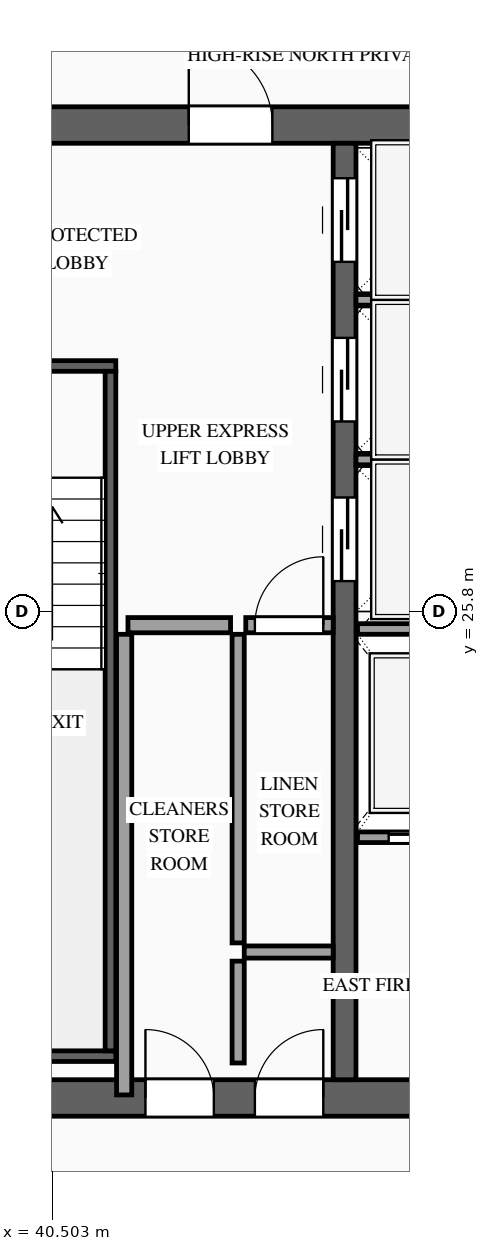
"""IFC4 building model, lengths in metres.
Left out: names, types, materials, properties, quantities, classifications, styles, units other than length and angle.
Written with IfcOpenShell. Run it as: python <this file> out.ifc"""

import sys

from ifc_helpers import new_model, si_unit, direction, frame, frame_2d, origin, place, context, subcontext, project, spatial, rectangle, extrude, source, transform, mapped, element, fill, save


model = new_model("IFC4")
c1 = context("Model", 3, precision=1e-05, world=origin(), true_north=direction((0.0, 1.0)))
c2 = subcontext(c1, "Body", "Model", "MODEL_VIEW")
j1 = project(units=[si_unit("LENGTHUNIT", "METRE"), si_unit("PLANEANGLEUNIT", "RADIAN")], contexts=[c1])
p1 = place(None, origin())
s1 = spatial("IfcSite", under=j1, at=p1, CompositionType="ELEMENT")
p2 = place(p1, origin())
s2 = spatial("IfcBuilding", under=s1, at=p2, CompositionType="ELEMENT")
p3 = place(p2, frame((0.0, 0.0, 289.1)))
s3 = spatial("IfcBuildingStorey", under=s2, at=p3, CompositionType="ELEMENT", Elevation=289.1)
p4 = place(p3, frame((23.56, 19.4, 0.0), z_axis=(0.0, 0.0, 1.0), x_axis=(1.0, 0.0, 0.0)))
e1 = element("IfcWall", 1, at=p4, inside=s3, PredefinedType="SHEAR", context=c2, shape_type="SweptSolid", body=[
    extrude(rectangle(XDim=26.88, YDim=0.48, at=frame_2d((13.44, 0.0))), origin(), (0.0, 0.0, 1.0), 3.5),
])
p5 = place(p4, frame((1.89, 0.0, 0.0)))
e2 = element("IfcOpeningElement", 2, at=p5, cuts=e1, PredefinedType="OPENING", context=c2, shape_type="SweptSolid", body=[
    extrude(rectangle(XDim=1.1, YDim=2.2, at=frame_2d((0.55, 1.1))), frame((0.0, 0.255, 0.0), z_axis=(0.0, -1.0, 0.0), x_axis=(1.0, 0.0, 0.0)), (0.0, 0.0, 1.0), 0.51),
])
p6 = place(p4, frame((9.79, 0.0, 0.0)))
e3 = element("IfcOpeningElement", 3, at=p6, cuts=e1, PredefinedType="OPENING", context=c2, shape_type="SweptSolid", body=[
    extrude(rectangle(XDim=1.1, YDim=2.2, at=frame_2d((0.55, 1.1))), frame((0.0, 0.255, 0.0), z_axis=(0.0, -1.0, 0.0), x_axis=(1.0, 0.0, 0.0)), (0.0, 0.0, 1.0), 0.51),
])
p7 = place(p4, frame((22.99, 0.0, 0.0)))
e4 = element("IfcOpeningElement", 4, at=p7, cuts=e1, PredefinedType="OPENING", context=c2, shape_type="SweptSolid", body=[
    extrude(rectangle(XDim=1.1, YDim=2.2, at=frame_2d((0.55, 1.1))), frame((0.0, 0.255, 0.0), z_axis=(0.0, -1.0, 0.0), x_axis=(1.0, 0.0, 0.0)), (0.0, 0.0, 1.0), 0.51),
])
p8 = place(p4, frame((19.61, 0.0, 0.0)))
e5 = element("IfcOpeningElement", 5, at=p8, cuts=e1, PredefinedType="OPENING", context=c2, shape_type="SweptSolid", body=[
    extrude(rectangle(XDim=0.9, YDim=2.15, at=frame_2d((0.45, 1.075))), frame((0.0, 0.255, 0.0), z_axis=(0.0, -1.0, 0.0), x_axis=(1.0, 0.0, 0.0)), (0.0, 0.0, 1.0), 0.51),
])
p9 = place(p4, frame((18.17, 0.0, 0.0)))
e6 = element("IfcOpeningElement", 6, at=p9, cuts=e1, PredefinedType="OPENING", context=c2, shape_type="SweptSolid", body=[
    extrude(rectangle(XDim=0.9, YDim=2.15, at=frame_2d((0.45, 1.075))), frame((0.0, 0.255, 0.0), z_axis=(0.0, -1.0, 0.0), x_axis=(1.0, 0.0, 0.0)), (0.0, 0.0, 1.0), 0.51),
])
p10 = place(p3, frame((23.56, 32.2, 0.0), z_axis=(0.0, 0.0, 1.0), x_axis=(1.0, 0.0, 0.0)))
e7 = element("IfcWall", 7, at=p10, inside=s3, PredefinedType="SHEAR", context=c2, shape_type="SweptSolid", body=[
    extrude(rectangle(XDim=26.88, YDim=0.48, at=frame_2d((13.44, 0.0))), origin(), (0.0, 0.0, 1.0), 3.5),
])
p11 = place(p10, frame((4.51, 0.0, 0.0)))
e8 = element("IfcOpeningElement", 8, at=p11, cuts=e7, PredefinedType="OPENING", context=c2, shape_type="SweptSolid", body=[
    extrude(rectangle(XDim=0.9, YDim=2.15, at=frame_2d((0.45, 1.075))), frame((0.0, 0.255, 0.0), z_axis=(0.0, -1.0, 0.0), x_axis=(1.0, 0.0, 0.0)), (0.0, 0.0, 1.0), 0.51),
])
p12 = place(p10, frame((9.79, 0.0, 0.0)))
e9 = element("IfcOpeningElement", 9, at=p12, cuts=e7, PredefinedType="OPENING", context=c2, shape_type="SweptSolid", body=[
    extrude(rectangle(XDim=1.1, YDim=2.2, at=frame_2d((0.55, 1.1))), frame((0.0, 0.255, 0.0), z_axis=(0.0, -1.0, 0.0), x_axis=(1.0, 0.0, 0.0)), (0.0, 0.0, 1.0), 0.51),
])
p13 = place(p10, frame((15.64, 0.0, 0.0)))
e10 = element("IfcOpeningElement", 10, at=p13, cuts=e7, PredefinedType="OPENING", context=c2, shape_type="SweptSolid", body=[
    extrude(rectangle(XDim=1.1, YDim=2.2, at=frame_2d((0.55, 1.1))), frame((0.0, 0.255, 0.0), z_axis=(0.0, -1.0, 0.0), x_axis=(1.0, 0.0, 0.0)), (0.0, 0.0, 1.0), 0.51),
])
p14 = place(p10, frame((18.74, 0.0, 0.0)))
e11 = element("IfcOpeningElement", 11, at=p14, cuts=e7, PredefinedType="OPENING", context=c2, shape_type="SweptSolid", body=[
    extrude(rectangle(XDim=1.1, YDim=2.2, at=frame_2d((0.55, 1.1))), frame((0.0, 0.255, 0.0), z_axis=(0.0, -1.0, 0.0), x_axis=(1.0, 0.0, 0.0)), (0.0, 0.0, 1.0), 0.51),
])
p15 = place(p3, frame((44.35, 19.64, 0.0), z_axis=(0.0, 0.0, 1.0), x_axis=(0.0, 1.0, 0.0)))
e12 = element("IfcWall", 12, at=p15, inside=s3, PredefinedType="SOLIDWALL", context=c2, shape_type="SweptSolid", body=[
    extrude(rectangle(XDim=12.32, YDim=0.3, at=frame_2d((6.16, 0.0))), origin(), (0.0, 0.0, 1.0), 3.5),
])
p16 = place(p15, frame((6.56, 0.0, 0.0)))
e13 = element("IfcOpeningElement", 13, at=p16, cuts=e12, PredefinedType="OPENING", context=c2, shape_type="SweptSolid", body=[
    extrude(rectangle(XDim=1.1, YDim=2.2, at=frame_2d((0.55, 1.1))), frame((0.0, 0.165, 0.0), z_axis=(0.0, -1.0, 0.0), x_axis=(1.0, 0.0, 0.0)), (0.0, 0.0, 1.0), 0.33),
])
p17 = place(p15, frame((8.66, 0.0, 0.0)))
e14 = element("IfcOpeningElement", 14, at=p17, cuts=e12, PredefinedType="OPENING", context=c2, shape_type="SweptSolid", body=[
    extrude(rectangle(XDim=1.1, YDim=2.2, at=frame_2d((0.55, 1.1))), frame((0.0, 0.165, 0.0), z_axis=(0.0, -1.0, 0.0), x_axis=(1.0, 0.0, 0.0)), (0.0, 0.0, 1.0), 0.33),
])
p18 = place(p15, frame((10.76, 0.0, 0.0)))
e15 = element("IfcOpeningElement", 15, at=p18, cuts=e12, PredefinedType="OPENING", context=c2, shape_type="SweptSolid", body=[
    extrude(rectangle(XDim=1.1, YDim=2.2, at=frame_2d((0.55, 1.1))), frame((0.0, 0.165, 0.0), z_axis=(0.0, -1.0, 0.0), x_axis=(1.0, 0.0, 0.0)), (0.0, 0.0, 1.0), 0.33),
])
p19 = place(p3, frame((44.52, 22.83, 0.0), z_axis=(0.0, 0.0, 1.0), x_axis=(1.0, 0.0, 0.0)))
e16 = element("IfcWall", 16, at=p19, inside=s3, PredefinedType="SOLIDWALL", context=c2, shape_type="SweptSolid", body=[
    extrude(rectangle(XDim=1.92, YDim=0.14, at=frame_2d((0.96, 0.0))), origin(), (0.0, 0.0, 1.0), 3.28),
])
p20 = place(p19, frame((0.41, 0.0, 0.0)))
e17 = element("IfcOpeningElement", 17, at=p20, cuts=e16, PredefinedType="OPENING", context=c2, shape_type="SweptSolid", body=[
    extrude(rectangle(XDim=1.1, YDim=2.2, at=frame_2d((0.55, 1.1))), frame((0.0, 0.085, 0.0), z_axis=(0.0, -1.0, 0.0), x_axis=(1.0, 0.0, 0.0)), (0.0, 0.0, 1.0), 0.17),
])
m1 = source(origin(), c2, "Body", "SweptSolid", [
    extrude(rectangle(XDim=1.92, YDim=0.14, at=frame_2d((0.96, 0.0))), origin(), (0.0, 0.0, 1.0), 3.28),
])
p21 = place(p3, frame((44.52, 25.57, 0.0), z_axis=(0.0, 0.0, 1.0), x_axis=(1.0, 0.0, 0.0)))
e18 = element("IfcWall", 18, at=p21, inside=s3, PredefinedType="SOLIDWALL", context=c2, shape_type="MappedRepresentation", body=[
    mapped(m1, transform((0.0, 0.0, 0.0), scale=1.0)),
])
m2 = source(origin(), c2, "Body", "SweptSolid", [
    extrude(rectangle(XDim=2.0, YDim=0.14, at=frame_2d((1.0, 0.0))), origin(), (0.0, 0.0, 1.0), 3.28),
])
for number, where, z_axis, x_axis in (
    (19, (44.5, 27.8, 0.0), (0.0, 0.0, 1.0), (1.0, 0.0, 0.0)),
    (20, (44.5, 29.9, 0.0), (0.0, 0.0, 1.0), (1.0, 0.0, 0.0)),
):
    element("IfcWall", number, at=place(p3, frame(where, z_axis=z_axis, x_axis=x_axis)), inside=s3, PredefinedType="SOLIDWALL", context=c2, shape_type="MappedRepresentation", body=[
        mapped(m2, transform((0.0, 0.0, 0.0), scale=1.0)),
    ])
p22 = place(p3, frame((38.2, 29.03, 0.0), z_axis=(0.0, 0.0, 1.0), x_axis=(1.0, 0.0, 0.0)))
e21 = element("IfcWall", 21, at=p22, inside=s3, PredefinedType="SOLIDWALL", context=c2, shape_type="SweptSolid", body=[
    extrude(rectangle(XDim=3.14, YDim=0.14, at=frame_2d((1.57, 0.0))), origin(), (0.0, 0.0, 1.0), 3.28),
])
p23 = place(p22, frame((1.02, 0.0, 0.0)))
e22 = element("IfcOpeningElement", 22, at=p23, cuts=e21, PredefinedType="OPENING", context=c2, shape_type="SweptSolid", body=[
    extrude(rectangle(XDim=1.1, YDim=2.2, at=frame_2d((0.55, 1.1))), frame((0.0, 0.085, 0.0), z_axis=(0.0, -1.0, 0.0), x_axis=(1.0, 0.0, 0.0)), (0.0, 0.0, 1.0), 0.17),
])
m3 = source(origin(), c2, "Body", "SweptSolid", [
    extrude(rectangle(XDim=3.14, YDim=0.14, at=frame_2d((1.57, 0.0))), origin(), (0.0, 0.0, 1.0), 3.28),
])
p24 = place(p3, frame((38.2, 19.95, 0.0), z_axis=(0.0, 0.0, 1.0), x_axis=(1.0, 0.0, 0.0)))
e23 = element("IfcWall", 23, at=p24, inside=s3, PredefinedType="SOLIDWALL", context=c2, shape_type="MappedRepresentation", body=[
    mapped(m3, transform((0.0, 0.0, 0.0), scale=1.0)),
])
m4 = source(origin(), c2, "Body", "SweptSolid", [
    extrude(rectangle(XDim=8.94, YDim=0.14, at=frame_2d((4.47, 0.0))), origin(), (0.0, 0.0, 1.0), 3.28),
])
p25 = place(p3, frame((41.27, 20.02, 0.0), z_axis=(0.0, 0.0, 1.0), x_axis=(0.0, 1.0, 0.0)))
e24 = element("IfcWall", 24, at=p25, inside=s3, PredefinedType="SOLIDWALL", context=c2, shape_type="MappedRepresentation", body=[
    mapped(m4, transform((0.0, 0.0, 0.0), scale=1.0)),
])
m5 = source(origin(), c2, "Body", "SweptSolid", [
    extrude(rectangle(XDim=1.34, YDim=0.16, at=frame_2d((0.67, 0.0))), origin(), (0.0, 0.0, 1.0), 3.28),
])
p26 = place(p3, frame((42.95, 19.86, 0.0), z_axis=(0.0, 0.0, 1.0), x_axis=(0.0, 1.0, 0.0)))
e25 = element("IfcWall", 25, at=p26, inside=s3, PredefinedType="PARTITIONING", context=c2, shape_type="MappedRepresentation", body=[
    mapped(m5, transform((0.0, 0.0, 0.0), scale=1.0)),
])
m6 = source(origin(), c2, "Body", "SweptSolid", [
    extrude(rectangle(XDim=1.17, YDim=0.16, at=frame_2d((0.585, 0.0))), origin(), (0.0, 0.0, 1.0), 3.28),
])
p27 = place(p3, frame((43.03, 21.32, 0.0), z_axis=(0.0, 0.0, 1.0), x_axis=(1.0, 0.0, 0.0)))
e26 = element("IfcWall", 26, at=p27, inside=s3, PredefinedType="PARTITIONING", context=c2, shape_type="MappedRepresentation", body=[
    mapped(m6, transform((0.0, 0.0, 0.0), scale=1.0)),
])
m7 = source(origin(), c2, "Body", "SweptSolid", [
    extrude(rectangle(XDim=6.06, YDim=0.2, at=frame_2d((3.03, 0.0))), origin(), (0.0, 0.0, 1.0), 3.28),
])
p28 = place(p3, frame((41.45, 19.44, 0.0), z_axis=(0.0, 0.0, 1.0), x_axis=(0.0, 1.0, 0.0)))
e27 = element("IfcWall", 27, at=p28, inside=s3, PredefinedType="PARTITIONING", context=c2, shape_type="MappedRepresentation", body=[
    mapped(m7, transform((0.0, 0.0, 0.0), scale=1.0)),
])
m8 = source(origin(), c2, "Body", "SweptSolid", [
    extrude(rectangle(XDim=1.35, YDim=0.2, at=frame_2d((0.675, 0.0))), origin(), (0.0, 0.0, 1.0), 3.28),
])
p29 = place(p3, frame((41.5, 25.62, 0.0), z_axis=(0.0, 0.0, 1.0), x_axis=(1.0, 0.0, 0.0)))
e28 = element("IfcWall", 28, at=p29, inside=s3, PredefinedType="PARTITIONING", context=c2, shape_type="MappedRepresentation", body=[
    mapped(m8, transform((0.0, 0.0, 0.0), scale=1.0)),
])
m9 = source(origin(), c2, "Body", "SweptSolid", [
    extrude(rectangle(XDim=4.06, YDim=0.16, at=frame_2d((2.03, 0.0))), origin(), (0.0, 0.0, 1.0), 3.28),
])
p30 = place(p3, frame((42.95, 21.44, 0.0), z_axis=(0.0, 0.0, 1.0), x_axis=(0.0, 1.0, 0.0)))
e29 = element("IfcWall", 29, at=p30, inside=s3, PredefinedType="PARTITIONING", context=c2, shape_type="MappedRepresentation", body=[
    mapped(m9, transform((0.0, 0.0, 0.0), scale=1.0)),
])
p31 = place(p3, frame((43.05, 25.62, 0.0), z_axis=(0.0, 0.0, 1.0), x_axis=(1.0, 0.0, 0.0)))
e30 = element("IfcWall", 30, at=p31, inside=s3, PredefinedType="PARTITIONING", context=c2, shape_type="SweptSolid", body=[
    extrude(rectangle(XDim=1.15, YDim=0.2, at=frame_2d((0.575, 0.0))), origin(), (0.0, 0.0, 1.0), 3.28),
])
p32 = place(p31, frame((0.12, 0.0, 0.0)))
e31 = element("IfcOpeningElement", 31, at=p32, cuts=e30, PredefinedType="OPENING", context=c2, shape_type="SweptSolid", body=[
    extrude(rectangle(XDim=0.9, YDim=2.15, at=frame_2d((0.45, 1.075))), frame((0.0, 0.115, 0.0), z_axis=(0.0, -1.0, 0.0), x_axis=(1.0, 0.0, 0.0)), (0.0, 0.0, 1.0), 0.23),
])
m10 = source(origin(), c2, "Body", "SweptSolid", [
    extrude(rectangle(XDim=1.1, YDim=2.2, at=frame_2d((0.55, 1.1))), frame((0.0, 0.025, 0.0), z_axis=(0.0, -1.0, 0.0), x_axis=(1.0, 0.0, 0.0)), (0.0, 0.0, 1.0), 0.05),
])
p33 = place(p20, origin())
e32 = element("IfcDoor", 32, at=p33, inside=s3, OperationType="SLIDING_TO_RIGHT", PredefinedType="DOOR", context=c2, shape_type="MappedRepresentation", body=[
    mapped(m10, transform((0.0, 0.0, 0.0), scale=1.0)),
])
fill(e17, e32)
p34 = place(p16, origin())
e33 = element("IfcDoor", 33, at=p34, inside=s3, OperationType="SLIDING_TO_LEFT", PredefinedType="DOOR", context=c2, shape_type="MappedRepresentation", body=[
    mapped(m10, transform((0.0, 0.0, 0.0), scale=1.0)),
])
fill(e13, e33)
p35 = place(p17, origin())
e34 = element("IfcDoor", 34, at=p35, inside=s3, OperationType="SLIDING_TO_RIGHT", PredefinedType="DOOR", context=c2, shape_type="MappedRepresentation", body=[
    mapped(m10, transform((0.0, 0.0, 0.0), scale=1.0)),
])
fill(e14, e34)
p36 = place(p18, origin())
e35 = element("IfcDoor", 35, at=p36, inside=s3, OperationType="SLIDING_TO_LEFT", PredefinedType="DOOR", context=c2, shape_type="MappedRepresentation", body=[
    mapped(m10, transform((0.0, 0.0, 0.0), scale=1.0)),
])
fill(e15, e35)
m11 = source(origin(), c2, "Body", "SweptSolid", [
    extrude(rectangle(XDim=1.1, YDim=2.2, at=frame_2d((0.55, 1.1))), frame((0.0, 0.025, 0.0), z_axis=(0.0, -1.0, 0.0), x_axis=(1.0, 0.0, 0.0)), (0.0, 0.0, 1.0), 0.05),
])
p37 = place(p14, origin())
e36 = element("IfcDoor", 36, at=p37, inside=s3, OperationType="SINGLE_SWING_LEFT", PredefinedType="DOOR", context=c2, shape_type="MappedRepresentation", body=[
    mapped(m11, transform((0.0, 0.0, 0.0), scale=1.0)),
])
fill(e11, e36)
m12 = source(origin(), c2, "Body", "SweptSolid", [
    extrude(rectangle(XDim=0.9, YDim=2.15, at=frame_2d((0.45, 1.075))), frame((0.0, 0.025, 0.0), z_axis=(0.0, -1.0, 0.0), x_axis=(1.0, 0.0, 0.0)), (0.0, 0.0, 1.0), 0.05),
])
p38 = place(p8, origin())
e37 = element("IfcDoor", 37, at=p38, inside=s3, OperationType="SINGLE_SWING_RIGHT", PredefinedType="DOOR", context=c2, shape_type="MappedRepresentation", body=[
    mapped(m12, transform((0.0, 0.0, 0.0), scale=1.0)),
])
fill(e5, e37)
p39 = place(p9, origin())
e38 = element("IfcDoor", 38, at=p39, inside=s3, OperationType="SINGLE_SWING_LEFT", PredefinedType="DOOR", context=c2, shape_type="MappedRepresentation", body=[
    mapped(m12, transform((0.0, 0.0, 0.0), scale=1.0)),
])
fill(e6, e38)
p40 = place(p32, origin())
e39 = element("IfcDoor", 39, at=p40, inside=s3, OperationType="SINGLE_SWING_RIGHT", PredefinedType="DOOR", context=c2, shape_type="MappedRepresentation", body=[
    mapped(m12, transform((0.0, 0.0, 0.0), scale=1.0)),
])
fill(e31, e39)
save(model, sys.argv[1])
